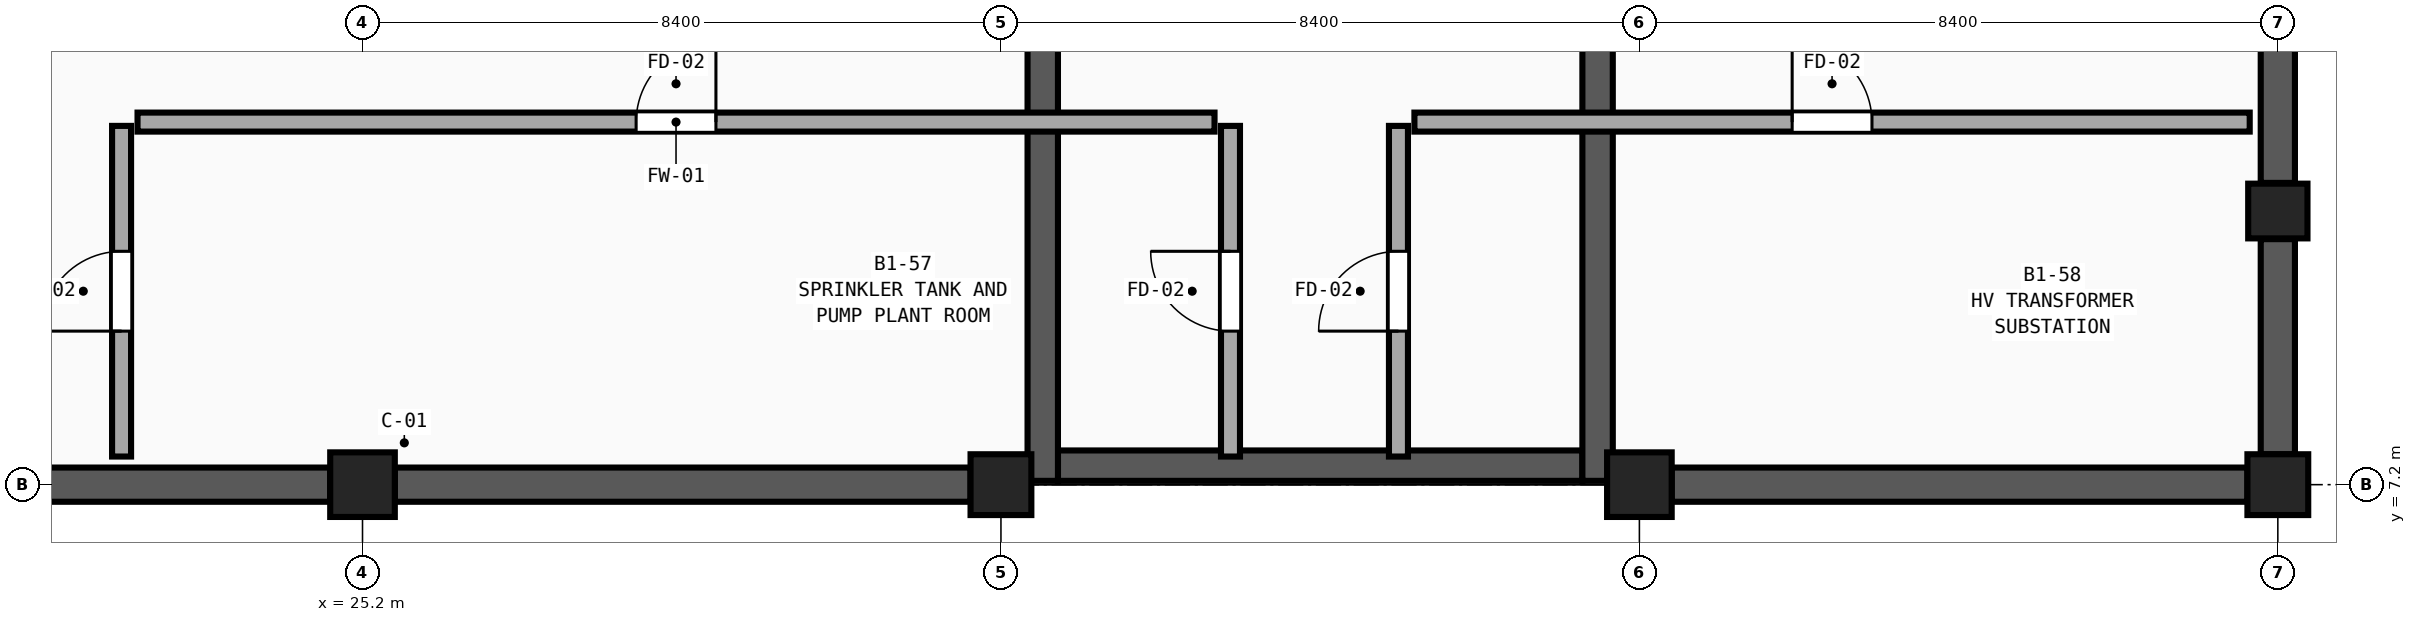
"""IFC4 building model, lengths in metres.
Left out: names, types, materials, properties, quantities, classifications, styles, units other than length and angle.
Written with IfcOpenShell. Run it as: python <this file> out.ifc"""

import sys

from ifc_helpers import new_model, si_unit, direction, frame, frame_2d, origin, origin_2d, place, context, subcontext, project, spatial, rectangle, extrude, element, fill, save


model = new_model("IFC4")
c1 = context("Model", 3, precision=1e-05, world=origin(), true_north=direction((0.0, 1.0)))
c2 = subcontext(c1, "Body", "Model", "MODEL_VIEW")
j1 = project(units=[si_unit("LENGTHUNIT", "METRE"), si_unit("PLANEANGLEUNIT", "RADIAN")], contexts=[c1])
p1 = place(None, origin())
s1 = spatial("IfcSite", under=j1, at=p1, CompositionType="ELEMENT")
p2 = place(p1, origin())
s2 = spatial("IfcBuilding", under=s1, at=p2, CompositionType="ELEMENT")
p3 = place(p2, frame((0.0, 0.0, -5.4)))
s3 = spatial("IfcBuildingStorey", under=s2, at=p3, CompositionType="ELEMENT", Elevation=-5.4)
p4 = place(p3, frame((25.2, 7.2, 0.0), z_axis=(0.0, 0.0, 1.0), x_axis=(1.0, 0.0, 0.0)))
e1 = element("IfcColumn", 1, at=p4, inside=s3, PredefinedType="COLUMN", context=c2, shape_type="SweptSolid", body=[
    extrude(rectangle(XDim=0.85, YDim=0.85, at=origin_2d()), origin(), (0.0, 0.0, 1.0), 5.4),
])
p5 = place(p3, frame((33.6, 7.2, 0.0), z_axis=(0.0, 0.0, 1.0), x_axis=(1.0, 0.0, 0.0)))
e2 = element("IfcColumn", 2, at=p5, inside=s3, PredefinedType="COLUMN", context=c2, shape_type="SweptSolid", body=[
    extrude(rectangle(XDim=0.8, YDim=0.8, at=origin_2d()), origin(), (0.0, 0.0, 1.0), 5.4),
])
p6 = place(p3, frame((42.0, 7.2, 0.0), z_axis=(0.0, 0.0, 1.0), x_axis=(1.0, 0.0, 0.0)))
e3 = element("IfcColumn", 3, at=p6, inside=s3, PredefinedType="COLUMN", context=c2, shape_type="SweptSolid", body=[
    extrude(rectangle(XDim=0.85, YDim=0.85, at=origin_2d()), origin(), (0.0, 0.0, 1.0), 5.4),
])
p7 = place(p3, frame((50.4, 7.2, 0.0), z_axis=(0.0, 0.0, 1.0), x_axis=(1.0, 0.0, 0.0)))
e4 = element("IfcColumn", 4, at=p7, inside=s3, PredefinedType="COLUMN", context=c2, shape_type="SweptSolid", body=[
    extrude(rectangle(XDim=0.8, YDim=0.8, at=origin_2d()), origin(), (0.0, 0.0, 1.0), 5.4),
])
p8 = place(p3, frame((50.4, 10.8, 0.0), z_axis=(0.0, 0.0, 1.0), x_axis=(1.0, 0.0, 0.0)))
e5 = element("IfcColumn", 5, at=p8, inside=s3, PredefinedType="PILASTER", context=c2, shape_type="SweptSolid", body=[
    extrude(rectangle(XDim=0.78, YDim=0.72, at=origin_2d()), origin(), (0.0, 0.0, 1.0), 5.4),
])
for number, where, z_axis, x_axis in (
    (6, (24.775, 7.2, 0.0), (0.0, 0.0, 1.0), (-1.0, 0.0, 0.0)),
    (7, (33.2, 7.2, 0.0), (0.0, 0.0, 1.0), (-1.0, 0.0, 0.0)),
    (8, (50.0, 7.2, 0.0), (0.0, 0.0, 1.0), (-1.0, 0.0, 0.0)),
):
    element("IfcWall", number, at=place(p3, frame(where, z_axis=z_axis, x_axis=x_axis)), inside=s3, PredefinedType="USERDEFINED", context=c2, shape_type="SweptSolid", body=[
        extrude(rectangle(XDim=7.575, YDim=0.45, at=frame_2d((3.788, 0.0))), origin(), (0.0, 0.0, 1.0), 4.5),
    ])
p9 = place(p3, frame((50.4, 13.975, 0.0), z_axis=(0.0, 0.0, 1.0), x_axis=(0.0, -1.0, 0.0)))
e9 = element("IfcWall", 9, at=p9, inside=s3, PredefinedType="USERDEFINED", context=c2, shape_type="SweptSolid", body=[
    extrude(rectangle(XDim=2.805, YDim=0.45, at=frame_2d((1.403, 0.0))), origin(), (0.0, 0.0, 1.0), 4.5),
])
p10 = place(p3, frame((50.4, 10.43, 0.0), z_axis=(0.0, 0.0, 1.0), x_axis=(0.0, -1.0, 0.0)))
e10 = element("IfcWall", 10, at=p10, inside=s3, PredefinedType="USERDEFINED", context=c2, shape_type="SweptSolid", body=[
    extrude(rectangle(XDim=2.83, YDim=0.45, at=frame_2d((1.415, 0.0))), origin(), (0.0, 0.0, 1.0), 4.5),
])
p11 = place(p3, frame((41.25, 7.45, 0.0), z_axis=(0.0, 0.0, 1.0), x_axis=(-1.0, 0.0, 0.0)))
e11 = element("IfcWall", 11, at=p11, inside=s3, PredefinedType="SHEAR", context=c2, shape_type="SweptSolid", body=[
    extrude(rectangle(XDim=6.9, YDim=0.4, at=frame_2d((3.45, 0.0))), origin(), (0.0, 0.0, 1.0), 5.4),
])
for number, where, z_axis, x_axis in (
    (12, (34.15, 15.3, 0.0), (0.0, 0.0, 1.0), (0.0, -1.0, 0.0)),
    (13, (41.45, 7.25, 0.0), (0.0, 0.0, 1.0), (0.0, 1.0, 0.0)),
):
    element("IfcWall", number, at=place(p3, frame(where, z_axis=z_axis, x_axis=x_axis)), inside=s3, PredefinedType="SHEAR", context=c2, shape_type="SweptSolid", body=[
        extrude(rectangle(XDim=8.05, YDim=0.4, at=frame_2d((4.025, 0.0))), origin(), (0.0, 0.0, 1.0), 5.4),
    ])
p12 = place(p3, frame((22.24, 11.97, 0.0), z_axis=(0.0, 0.0, 1.0), x_axis=(1.0, 0.0, 0.0)))
e14 = element("IfcWall", 14, at=p12, inside=s3, PredefinedType="SOLIDWALL", context=c2, shape_type="SweptSolid", body=[
    extrude(rectangle(XDim=14.17, YDim=0.25, at=frame_2d((7.085, 0.0))), origin(), (0.0, 0.0, 1.0), 5.05),
])
p13 = place(p12, frame((6.56, 0.0, 0.0)))
e15 = element("IfcOpeningElement", 15, at=p13, cuts=e14, PredefinedType="OPENING", context=c2, shape_type="SweptSolid", body=[
    extrude(rectangle(XDim=1.05, YDim=2.15, at=frame_2d((0.525, 1.075))), frame((0.0, 0.145, 0.0), z_axis=(0.0, -1.0, 0.0), x_axis=(1.0, 0.0, 0.0)), (0.0, 0.0, 1.0), 0.29),
])
p14 = place(p3, frame((39.04, 11.97, 0.0), z_axis=(0.0, 0.0, 1.0), x_axis=(1.0, 0.0, 0.0)))
e16 = element("IfcWall", 16, at=p14, inside=s3, PredefinedType="SOLIDWALL", context=c2, shape_type="SweptSolid", body=[
    extrude(rectangle(XDim=10.99, YDim=0.25, at=frame_2d((5.495, 0.0))), origin(), (0.0, 0.0, 1.0), 5.05),
])
p15 = place(p14, frame((4.97, 0.0, 0.0)))
e17 = element("IfcOpeningElement", 17, at=p15, cuts=e16, PredefinedType="OPENING", context=c2, shape_type="SweptSolid", body=[
    extrude(rectangle(XDim=1.05, YDim=2.15, at=frame_2d((0.525, 1.075))), frame((0.0, 0.145, 0.0), z_axis=(0.0, -1.0, 0.0), x_axis=(1.0, 0.0, 0.0)), (0.0, 0.0, 1.0), 0.29),
])
p16 = place(p3, frame((22.03, 7.57, 0.0), z_axis=(0.0, 0.0, 1.0), x_axis=(0.0, 1.0, 0.0)))
e18 = element("IfcWall", 18, at=p16, inside=s3, PredefinedType="SOLIDWALL", context=c2, shape_type="SweptSolid", body=[
    extrude(rectangle(XDim=4.35, YDim=0.25, at=frame_2d((2.175, 0.0))), origin(), (0.0, 0.0, 1.0), 5.05),
])
p17 = place(p16, frame((1.65, 0.0, 0.0)))
e19 = element("IfcOpeningElement", 19, at=p17, cuts=e18, PredefinedType="OPENING", context=c2, shape_type="SweptSolid", body=[
    extrude(rectangle(XDim=1.05, YDim=2.15, at=frame_2d((0.525, 1.075))), frame((0.0, 0.145, 0.0), z_axis=(0.0, -1.0, 0.0), x_axis=(1.0, 0.0, 0.0)), (0.0, 0.0, 1.0), 0.29),
])
p18 = place(p3, frame((36.62, 7.57, 0.0), z_axis=(0.0, 0.0, 1.0), x_axis=(0.0, 1.0, 0.0)))
e20 = element("IfcWall", 20, at=p18, inside=s3, PredefinedType="SOLIDWALL", context=c2, shape_type="SweptSolid", body=[
    extrude(rectangle(XDim=4.35, YDim=0.25, at=frame_2d((2.175, 0.0))), origin(), (0.0, 0.0, 1.0), 5.05),
])
p19 = place(p18, frame((1.65, 0.0, 0.0)))
e21 = element("IfcOpeningElement", 21, at=p19, cuts=e20, PredefinedType="OPENING", context=c2, shape_type="SweptSolid", body=[
    extrude(rectangle(XDim=1.05, YDim=2.15, at=frame_2d((0.525, 1.075))), frame((0.0, 0.145, 0.0), z_axis=(0.0, -1.0, 0.0), x_axis=(1.0, 0.0, 0.0)), (0.0, 0.0, 1.0), 0.29),
])
p20 = place(p3, frame((38.83, 7.57, 0.0), z_axis=(0.0, 0.0, 1.0), x_axis=(0.0, 1.0, 0.0)))
e22 = element("IfcWall", 22, at=p20, inside=s3, PredefinedType="SOLIDWALL", context=c2, shape_type="SweptSolid", body=[
    extrude(rectangle(XDim=4.35, YDim=0.25, at=frame_2d((2.175, 0.0))), origin(), (0.0, 0.0, 1.0), 5.05),
])
p21 = place(p20, frame((1.65, 0.0, 0.0)))
e23 = element("IfcOpeningElement", 23, at=p21, cuts=e22, PredefinedType="OPENING", context=c2, shape_type="SweptSolid", body=[
    extrude(rectangle(XDim=1.05, YDim=2.15, at=frame_2d((0.525, 1.075))), frame((0.0, 0.145, 0.0), z_axis=(0.0, -1.0, 0.0), x_axis=(1.0, 0.0, 0.0)), (0.0, 0.0, 1.0), 0.29),
])
p22 = place(p13, origin())
e24 = element("IfcDoor", 24, at=p22, inside=s3, OperationType="SINGLE_SWING_RIGHT", PredefinedType="DOOR", context=c2, shape_type="SweptSolid", body=[
    extrude(rectangle(XDim=1.05, YDim=2.15, at=frame_2d((0.525, 1.075))), frame((0.0, 0.025, 0.0), z_axis=(0.0, -1.0, 0.0), x_axis=(1.0, 0.0, 0.0)), (0.0, 0.0, 1.0), 0.05),
])
fill(e15, e24)
p23 = place(p15, origin())
e25 = element("IfcDoor", 25, at=p23, inside=s3, OperationType="SINGLE_SWING_LEFT", PredefinedType="DOOR", context=c2, shape_type="SweptSolid", body=[
    extrude(rectangle(XDim=1.05, YDim=2.15, at=frame_2d((0.525, 1.075))), frame((0.0, 0.025, 0.0), z_axis=(0.0, -1.0, 0.0), x_axis=(1.0, 0.0, 0.0)), (0.0, 0.0, 1.0), 0.05),
])
fill(e17, e25)
p24 = place(p17, origin())
e26 = element("IfcDoor", 26, at=p24, inside=s3, OperationType="SINGLE_SWING_LEFT", PredefinedType="DOOR", context=c2, shape_type="SweptSolid", body=[
    extrude(rectangle(XDim=1.05, YDim=2.15, at=frame_2d((0.525, 1.075))), frame((0.0, 0.025, 0.0), z_axis=(0.0, -1.0, 0.0), x_axis=(1.0, 0.0, 0.0)), (0.0, 0.0, 1.0), 0.05),
])
fill(e19, e26)
p25 = place(p19, origin())
e27 = element("IfcDoor", 27, at=p25, inside=s3, OperationType="SINGLE_SWING_RIGHT", PredefinedType="DOOR", context=c2, shape_type="SweptSolid", body=[
    extrude(rectangle(XDim=1.05, YDim=2.15, at=frame_2d((0.525, 1.075))), frame((0.0, 0.025, 0.0), z_axis=(0.0, -1.0, 0.0), x_axis=(1.0, 0.0, 0.0)), (0.0, 0.0, 1.0), 0.05),
])
fill(e21, e27)
p26 = place(p21, origin())
e28 = element("IfcDoor", 28, at=p26, inside=s3, OperationType="SINGLE_SWING_LEFT", PredefinedType="DOOR", context=c2, shape_type="SweptSolid", body=[
    extrude(rectangle(XDim=1.05, YDim=2.15, at=frame_2d((0.525, 1.075))), frame((0.0, 0.025, 0.0), z_axis=(0.0, -1.0, 0.0), x_axis=(1.0, 0.0, 0.0)), (0.0, 0.0, 1.0), 0.05),
])
fill(e23, e28)
save(model, sys.argv[1])
